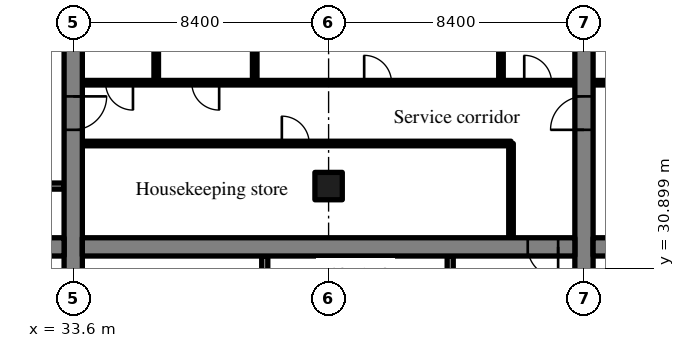
"""IFC4 building model, lengths in metres.
Left out: names, types, materials, properties, quantities, classifications, styles, units other than length and angle.
Written with IfcOpenShell. Run it as: python <this file> out.ifc"""

import sys

from ifc_helpers import new_model, si_unit, direction, frame, frame_2d, origin, origin_2d, place, context, subcontext, project, spatial, rectangle, extrude, source, transform, mapped, element, fill, save


model = new_model("IFC4")
c1 = context("Model", 3, precision=1e-05, world=origin(), true_north=direction((0.0, 1.0)))
c2 = subcontext(c1, "Body", "Model", "MODEL_VIEW")
j1 = project(units=[si_unit("LENGTHUNIT", "METRE"), si_unit("PLANEANGLEUNIT", "RADIAN")], contexts=[c1])
p1 = place(None, origin())
s1 = spatial("IfcSite", under=j1, at=p1, CompositionType="ELEMENT")
p2 = place(p1, origin())
s2 = spatial("IfcBuilding", under=s1, at=p2, CompositionType="ELEMENT")
p3 = place(p2, frame((0.0, 0.0, -9.0)))
s3 = spatial("IfcBuildingStorey", under=s2, at=p3, CompositionType="ELEMENT", Elevation=-9.0)
m1 = source(origin(), c2, "Body", "SweptSolid", [
    extrude(rectangle(XDim=17.8, YDim=0.6, at=frame_2d((8.9, 0.0))), origin(), (0.0, 0.0, 1.0), 4.22),
])
p4 = place(p3, frame((33.6, 23.1, 0.0), z_axis=(0.0, 0.0, 1.0), x_axis=(0.0, 1.0, 0.0)))
e1 = element("IfcWall", 1, at=p4, inside=s3, PredefinedType="SHEAR", context=c2, shape_type="MappedRepresentation", body=[
    mapped(m1, transform((0.0, 0.0, 0.0), scale=1.0)),
])
m2 = source(origin(), c2, "Body", "SweptSolid", [
    extrude(rectangle(XDim=1.1, YDim=2.1, at=frame_2d((0.55, 1.05))), frame((0.0, 0.31, 0.0), z_axis=(0.0, -1.0, 0.0), x_axis=(1.0, 0.0, 0.0)), (0.0, 0.0, 1.0), 0.62),
])
p5 = place(p4, frame((12.35, 0.0, 0.0)))
e2 = element("IfcOpeningElement", 2, at=p5, cuts=e1, PredefinedType="OPENING", context=c2, shape_type="MappedRepresentation", body=[
    mapped(m2, transform((0.0, 0.0, 0.0), scale=1.0)),
])
p6 = place(p3, frame((50.4, 23.1, 0.0), z_axis=(0.0, 0.0, 1.0), x_axis=(0.0, 1.0, 0.0)))
e3 = element("IfcWall", 3, at=p6, inside=s3, PredefinedType="SHEAR", context=c2, shape_type="MappedRepresentation", body=[
    mapped(m1, transform((0.0, 0.0, 0.0), scale=1.0)),
])
p7 = place(p6, frame((12.35, 0.0, 0.0)))
e4 = element("IfcOpeningElement", 4, at=p7, cuts=e3, PredefinedType="OPENING", context=c2, shape_type="MappedRepresentation", body=[
    mapped(m2, transform((0.0, 0.0, 0.0), scale=1.0)),
])
m3 = source(origin(), c2, "Body", "SweptSolid", [
    extrude(rectangle(XDim=7.0, YDim=0.6, at=frame_2d((3.5, 0.0))), origin(), (0.0, 0.0, 1.0), 4.22),
])
p8 = place(p3, frame((26.3, 31.6, 0.0), z_axis=(0.0, 0.0, 1.0), x_axis=(1.0, 0.0, 0.0)))
e5 = element("IfcWall", 5, at=p8, inside=s3, PredefinedType="SHEAR", context=c2, shape_type="MappedRepresentation", body=[
    mapped(m3, transform((0.0, 0.0, 0.0), scale=1.0)),
])
p9 = place(p8, frame((5.375, 0.0, 0.0)))
e6 = element("IfcOpeningElement", 6, at=p9, cuts=e5, PredefinedType="OPENING", context=c2, shape_type="MappedRepresentation", body=[
    mapped(m2, transform((0.0, 0.0, 0.0), scale=1.0)),
])
m4 = source(origin(), c2, "Body", "SweptSolid", [
    extrude(rectangle(XDim=16.2, YDim=0.6, at=frame_2d((8.1, 0.0))), origin(), (0.0, 0.0, 1.0), 4.22),
])
p10 = place(p3, frame((33.9, 31.6, 0.0), z_axis=(0.0, 0.0, 1.0), x_axis=(1.0, 0.0, 0.0)))
e7 = element("IfcWall", 7, at=p10, inside=s3, PredefinedType="SHEAR", context=c2, shape_type="MappedRepresentation", body=[
    mapped(m4, transform((0.0, 0.0, 0.0), scale=1.0)),
])
m5 = source(origin(), c2, "Body", "SweptSolid", [
    extrude(rectangle(XDim=1.0, YDim=2.1, at=frame_2d((0.5, 1.05))), frame((0.0, 0.31, 0.0), z_axis=(0.0, -1.0, 0.0), x_axis=(1.0, 0.0, 0.0)), (0.0, 0.0, 1.0), 0.62),
])
p11 = place(p10, frame((14.65, 0.0, 0.0)))
e8 = element("IfcOpeningElement", 8, at=p11, cuts=e7, PredefinedType="OPENING", context=c2, shape_type="MappedRepresentation", body=[
    mapped(m5, transform((0.0, 0.0, 0.0), scale=1.0)),
])
m6 = source(origin(), c2, "Body", "SweptSolid", [
    extrude(rectangle(XDim=16.2, YDim=0.6, at=frame_2d((8.1, 0.0))), origin(), (0.0, 0.0, 1.0), 4.22),
])
p12 = place(p3, frame((50.7, 31.6, 0.0), z_axis=(0.0, 0.0, 1.0), x_axis=(1.0, 0.0, 0.0)))
e9 = element("IfcWall", 9, at=p12, inside=s3, PredefinedType="SHEAR", context=c2, shape_type="MappedRepresentation", body=[
    mapped(m6, transform((0.0, 0.0, 0.0), scale=1.0)),
])
p13 = place(p12, frame((0.55, 0.0, 0.0)))
e10 = element("IfcOpeningElement", 10, at=p13, cuts=e9, PredefinedType="OPENING", context=c2, shape_type="MappedRepresentation", body=[
    mapped(m5, transform((0.0, 0.0, 0.0), scale=1.0)),
])
m7 = source(origin(), c2, "Body", "SweptSolid", [
    extrude(rectangle(XDim=0.9, YDim=0.9, at=origin_2d()), origin(), (0.0, 0.0, 1.0), 4.22),
])
p14 = place(p3, frame((42.0, 33.6, 0.0), z_axis=(0.0, 0.0, 1.0), x_axis=(1.0, 0.0, 0.0)))
e11 = element("IfcColumn", 11, at=p14, inside=s3, PredefinedType="COLUMN", context=c2, shape_type="MappedRepresentation", body=[
    mapped(m7, transform((0.0, 0.0, 0.0), scale=1.0)),
])
m8 = source(origin(), c2, "Body", "SweptSolid", [
    extrude(rectangle(XDim=2.5, YDim=0.2, at=frame_2d((1.25, 0.0))), origin(), (0.0, 0.0, 1.0), 4.22),
])
p15 = place(p3, frame((46.0, 28.8, 0.0), z_axis=(0.0, 0.0, 1.0), x_axis=(0.0, 1.0, 0.0)))
e12 = element("IfcWall", 12, at=p15, inside=s3, PredefinedType="SOLIDWALL", context=c2, shape_type="MappedRepresentation", body=[
    mapped(m8, transform((0.0, 0.0, 0.0), scale=1.0)),
])
m9 = source(origin(), c2, "Body", "SweptSolid", [
    extrude(rectangle(XDim=2.4, YDim=0.2, at=frame_2d((1.2, 0.0))), origin(), (0.0, 0.0, 1.0), 4.22),
])
p16 = place(p3, frame((39.9, 28.9, 0.0), z_axis=(0.0, 0.0, 1.0), x_axis=(0.0, 1.0, 0.0)))
e13 = element("IfcWall", 13, at=p16, inside=s3, PredefinedType="PARTITIONING", context=c2, shape_type="MappedRepresentation", body=[
    mapped(m9, transform((0.0, 0.0, 0.0), scale=1.0)),
])
m10 = source(origin(), c2, "Body", "SweptSolid", [
    extrude(rectangle(XDim=3.1, YDim=0.15, at=frame_2d((1.55, 0.0))), origin(), (0.0, 0.0, 1.0), 4.22),
])
p17 = place(p3, frame((48.0, 31.9, 0.0), z_axis=(0.0, 0.0, 1.0), x_axis=(0.0, 1.0, 0.0)))
e14 = element("IfcWall", 14, at=p17, inside=s3, PredefinedType="PARTITIONING", context=c2, shape_type="MappedRepresentation", body=[
    mapped(m10, transform((0.0, 0.0, 0.0), scale=1.0)),
])
m11 = source(origin(), c2, "Body", "SweptSolid", [
    extrude(rectangle(XDim=14.1, YDim=0.15, at=frame_2d((7.05, 0.0))), origin(), (0.0, 0.0, 1.0), 4.22),
])
p18 = place(p3, frame((33.9, 35.0, 0.0), z_axis=(0.0, 0.0, 1.0), x_axis=(1.0, 0.0, 0.0)))
e15 = element("IfcWall", 15, at=p18, inside=s3, PredefinedType="PARTITIONING", context=c2, shape_type="MappedRepresentation", body=[
    mapped(m11, transform((0.0, 0.0, 0.0), scale=1.0)),
])
m12 = source(origin(), c2, "Body", "SweptSolid", [
    extrude(rectangle(XDim=0.9, YDim=2.1, at=frame_2d((0.45, 1.05))), frame((0.0, 0.085, 0.0), z_axis=(0.0, -1.0, 0.0), x_axis=(1.0, 0.0, 0.0)), (0.0, 0.0, 1.0), 0.17),
])
p19 = place(p18, frame((6.562, 0.0, 0.0)))
e16 = element("IfcOpeningElement", 16, at=p19, cuts=e15, PredefinedType="OPENING", context=c2, shape_type="MappedRepresentation", body=[
    mapped(m12, transform((0.0, 0.0, 0.0), scale=1.0)),
])
m13 = source(origin(), c2, "Body", "SweptSolid", [
    extrude(rectangle(XDim=16.2, YDim=0.15, at=frame_2d((8.1, 0.0))), origin(), (0.0, 0.0, 1.0), 4.22),
])
p20 = place(p3, frame((33.9, 37.0, 0.0), z_axis=(0.0, 0.0, 1.0), x_axis=(1.0, 0.0, 0.0)))
e17 = element("IfcWall", 17, at=p20, inside=s3, PredefinedType="PARTITIONING", context=c2, shape_type="MappedRepresentation", body=[
    mapped(m13, transform((0.0, 0.0, 0.0), scale=1.0)),
])
p21 = place(p20, frame((0.765, 0.0, 0.0)))
e18 = element("IfcOpeningElement", 18, at=p21, cuts=e17, PredefinedType="OPENING", context=c2, shape_type="MappedRepresentation", body=[
    mapped(m12, transform((0.0, 0.0, 0.0), scale=1.0)),
])
p22 = place(p20, frame((3.6, 0.0, 0.0)))
e19 = element("IfcOpeningElement", 19, at=p22, cuts=e17, PredefinedType="OPENING", context=c2, shape_type="MappedRepresentation", body=[
    mapped(m12, transform((0.0, 0.0, 0.0), scale=1.0)),
])
p23 = place(p20, frame((9.27, 0.0, 0.0)))
e20 = element("IfcOpeningElement", 20, at=p23, cuts=e17, PredefinedType="OPENING", context=c2, shape_type="MappedRepresentation", body=[
    mapped(m12, transform((0.0, 0.0, 0.0), scale=1.0)),
])
p24 = place(p20, frame((14.535, 0.0, 0.0)))
e21 = element("IfcOpeningElement", 21, at=p24, cuts=e17, PredefinedType="OPENING", context=c2, shape_type="MappedRepresentation", body=[
    mapped(m12, transform((0.0, 0.0, 0.0), scale=1.0)),
])
m14 = source(origin(), c2, "Body", "SweptSolid", [
    extrude(rectangle(XDim=3.9, YDim=0.15, at=frame_2d((1.95, 0.0))), origin(), (0.0, 0.0, 1.0), 4.22),
])
for number, where, z_axis, x_axis in (
    (22, (36.33, 37.0, 0.0), (0.0, 0.0, 1.0), (0.0, 1.0, 0.0)),
    (23, (39.57, 37.0, 0.0), (0.0, 0.0, 1.0), (0.0, 1.0, 0.0)),
    (24, (47.67, 37.0, 0.0), (0.0, 0.0, 1.0), (0.0, 1.0, 0.0)),
):
    element("IfcWall", number, at=place(p3, frame(where, z_axis=z_axis, x_axis=x_axis)), inside=s3, PredefinedType="PARTITIONING", context=c2, shape_type="MappedRepresentation", body=[
        mapped(m14, transform((0.0, 0.0, 0.0), scale=1.0)),
    ])
m15 = source(origin(), c2, "Body", "SweptSolid", [
    extrude(rectangle(XDim=16.2, YDim=0.15, at=frame_2d((8.1, 0.0))), origin(), (0.0, 0.0, 1.0), 4.22),
])
p25 = place(p3, frame((66.9, 37.0, 0.0), z_axis=(0.0, 0.0, 1.0), x_axis=(-1.0, 0.0, 0.0)))
e25 = element("IfcWall", 25, at=p25, inside=s3, PredefinedType="PARTITIONING", context=c2, shape_type="MappedRepresentation", body=[
    mapped(m15, transform((0.0, 0.0, 0.0), scale=1.0)),
])
p26 = place(p25, frame((6.435, 0.0, 0.0)))
e26 = element("IfcOpeningElement", 26, at=p26, cuts=e25, PredefinedType="OPENING", context=c2, shape_type="MappedRepresentation", body=[
    mapped(m12, transform((0.0, 0.0, 0.0), scale=1.0)),
])
p27 = place(p25, frame((14.535, 0.0, 0.0)))
e27 = element("IfcOpeningElement", 27, at=p27, cuts=e25, PredefinedType="OPENING", context=c2, shape_type="MappedRepresentation", body=[
    mapped(m12, transform((0.0, 0.0, 0.0), scale=1.0)),
])
m16 = source(origin(), c2, "Body", "SweptSolid", [
    extrude(rectangle(XDim=2.15, YDim=0.2, at=frame_2d((1.075, 0.0))), origin(), (0.0, 0.0, 1.0), 4.22),
])
p28 = place(p3, frame((31.15, 33.6, 0.0), z_axis=(0.0, 0.0, 1.0), x_axis=(1.0, 0.0, 0.0)))
e28 = element("IfcWall", 28, at=p28, inside=s3, PredefinedType="SOLIDWALL", context=c2, shape_type="MappedRepresentation", body=[
    mapped(m16, transform((0.0, 0.0, 0.0), scale=1.0)),
])
m17 = source(origin(), c2, "Body", "SweptSolid", [
    extrude(rectangle(XDim=1.0, YDim=2.1, at=frame_2d((0.5, 1.05))), frame((0.0, 0.025, 0.0), z_axis=(0.0, -1.0, 0.0), x_axis=(1.0, 0.0, 0.0)), (0.0, 0.0, 1.0), 0.05),
])
p29 = place(p11, origin())
e29 = element("IfcDoor", 29, at=p29, inside=s3, OperationType="SINGLE_SWING_RIGHT", PredefinedType="DOOR", context=c2, shape_type="MappedRepresentation", body=[
    mapped(m17, transform((0.0, 0.0, 0.0), scale=1.0)),
])
fill(e8, e29)
m18 = source(origin(), c2, "Body", "SweptSolid", [
    extrude(rectangle(XDim=0.9, YDim=2.1, at=frame_2d((0.45, 1.05))), frame((0.0, 0.025, 0.0), z_axis=(0.0, -1.0, 0.0), x_axis=(1.0, 0.0, 0.0)), (0.0, 0.0, 1.0), 0.05),
])
p30 = place(p19, origin())
e30 = element("IfcDoor", 30, at=p30, inside=s3, OperationType="SINGLE_SWING_LEFT", PredefinedType="DOOR", context=c2, shape_type="MappedRepresentation", body=[
    mapped(m18, transform((0.0, 0.0, 0.0), scale=1.0)),
])
fill(e16, e30)
p31 = place(p21, origin())
e31 = element("IfcDoor", 31, at=p31, inside=s3, OperationType="SINGLE_SWING_RIGHT", PredefinedType="DOOR", context=c2, shape_type="MappedRepresentation", body=[
    mapped(m18, transform((0.0, 0.0, 0.0), scale=1.0)),
])
fill(e18, e31)
p32 = place(p22, origin())
e32 = element("IfcDoor", 32, at=p32, inside=s3, OperationType="SINGLE_SWING_RIGHT", PredefinedType="DOOR", context=c2, shape_type="MappedRepresentation", body=[
    mapped(m18, transform((0.0, 0.0, 0.0), scale=1.0)),
])
fill(e19, e32)
p33 = place(p23, origin())
e33 = element("IfcDoor", 33, at=p33, inside=s3, OperationType="SINGLE_SWING_LEFT", PredefinedType="DOOR", context=c2, shape_type="MappedRepresentation", body=[
    mapped(m18, transform((0.0, 0.0, 0.0), scale=1.0)),
])
fill(e20, e33)
p34 = place(p24, origin())
e34 = element("IfcDoor", 34, at=p34, inside=s3, OperationType="SINGLE_SWING_LEFT", PredefinedType="DOOR", context=c2, shape_type="MappedRepresentation", body=[
    mapped(m18, transform((0.0, 0.0, 0.0), scale=1.0)),
])
fill(e21, e34)
m19 = source(origin(), c2, "Body", "SweptSolid", [
    extrude(rectangle(XDim=1.1, YDim=2.1, at=frame_2d((0.55, 1.05))), frame((0.0, 0.025, 0.0), z_axis=(0.0, -1.0, 0.0), x_axis=(1.0, 0.0, 0.0)), (0.0, 0.0, 1.0), 0.05),
])
p35 = place(p5, origin())
e35 = element("IfcDoor", 35, at=p35, inside=s3, OperationType="SINGLE_SWING_RIGHT", PredefinedType="DOOR", context=c2, shape_type="MappedRepresentation", body=[
    mapped(m19, transform((0.0, 0.0, 0.0), scale=1.0)),
])
fill(e2, e35)
p36 = place(p7, origin())
e36 = element("IfcDoor", 36, at=p36, inside=s3, OperationType="SINGLE_SWING_LEFT", PredefinedType="DOOR", context=c2, shape_type="MappedRepresentation", body=[
    mapped(m19, transform((0.0, 0.0, 0.0), scale=1.0)),
])
fill(e4, e36)
save(model, sys.argv[1])
